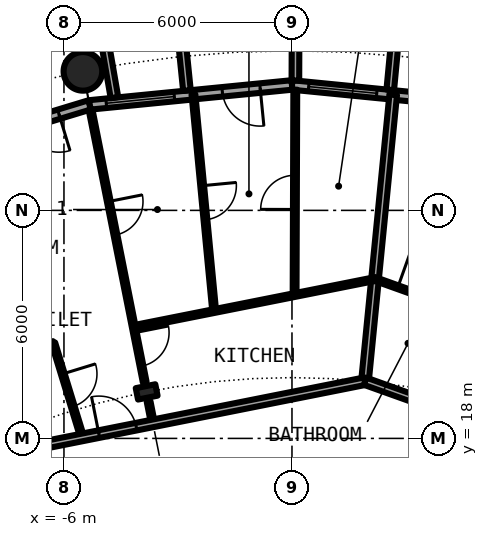
"""IFC4 building model, lengths in metres.
Left out: names, types, materials, properties, quantities, classifications, styles, units other than length and angle.
Written with IfcOpenShell. Run it as: python <this file> out.ifc"""

import sys

from ifc_helpers import new_model, si_unit, direction, frame, frame_2d, origin, origin_2d, place, context, subcontext, project, spatial, rectangle, hollow_circle, i_section, extrude, element, fill, save


model = new_model("IFC4")
c1 = context("Model", 3, precision=1e-05, world=origin(), true_north=direction((0.0, 1.0)))
c2 = subcontext(c1, "Body", "Model", "MODEL_VIEW")
j1 = project(units=[si_unit("LENGTHUNIT", "METRE"), si_unit("PLANEANGLEUNIT", "RADIAN")], contexts=[c1])
p1 = place(None, origin())
s1 = spatial("IfcSite", under=j1, at=p1, CompositionType="ELEMENT")
p2 = place(p1, origin())
s2 = spatial("IfcBuilding", under=s1, at=p2, CompositionType="ELEMENT")
p3 = place(p2, frame((0.0, 0.0, 63.6)))
s3 = spatial("IfcBuildingStorey", under=s2, at=p3, CompositionType="ELEMENT", Elevation=63.6)
p4 = place(p3, frame((-5.501, 27.658, 0.0), z_axis=(0.0, 0.0, 1.0), x_axis=(1.0, 0.0, 0.0)))
e1 = element("IfcColumn", 1, at=p4, inside=s3, PredefinedType="COLUMN", context=c2, shape_type="SweptSolid", body=[
    extrude(hollow_circle(Radius=0.508, WallThickness=0.04, at=origin_2d()), origin(), (0.0, 0.0, 1.0), 3.05),
])
p5 = place(p3, frame((-3.824, 19.223, 0.0), z_axis=(0.0, 0.0, 1.0), x_axis=(-0.195090322016, 0.980785280403, 0.0)))
e2 = element("IfcColumn", 2, at=p5, inside=s3, PredefinedType="COLUMN", context=c2, shape_type="SweptSolid", body=[
    extrude(i_section(OverallWidth=0.306, OverallDepth=0.524, WebThickness=0.021, FlangeThickness=0.04, FilletRadius=0.027, at=origin_2d()), origin(), (0.0, 0.0, 1.0), 3.05),
])
p6 = place(p3, frame((5.326, 26.775, 0.0), z_axis=(0.0, 0.0, 1.0), x_axis=(-0.995173996315, 0.098126026407, 0.0)))
e3 = element("IfcWall", 3, at=p6, inside=s3, PredefinedType="SOLIDWALL", context=c2, shape_type="SweptSolid", body=[
    extrude(rectangle(XDim=5.352, YDim=0.25, at=frame_2d((2.676, 0.0))), origin(), (0.0, 0.0, 1.0), 2.7),
])
p7 = place(p6, frame((0.841, 0.0, 0.0)))
e4 = element("IfcOpeningElement", 4, at=p7, cuts=e3, PredefinedType="OPENING", context=c2, shape_type="SweptSolid", body=[
    extrude(rectangle(XDim=1.0, YDim=2.2, at=frame_2d((0.5, 1.1))), frame((0.0, 0.135, 0.0), z_axis=(0.0, -1.0, 0.0), x_axis=(1.0, 0.0, 0.0)), (0.0, 0.0, 1.0), 0.27),
])
p8 = place(p6, frame((3.111, 0.0, 0.3)))
e5 = element("IfcOpeningElement", 5, at=p8, cuts=e3, PredefinedType="OPENING", context=c2, shape_type="SweptSolid", body=[
    extrude(rectangle(XDim=1.8, YDim=2.1, at=frame_2d((0.9, 1.05))), frame((0.0, 0.135, 0.0), z_axis=(0.0, -1.0, 0.0), x_axis=(1.0, 0.0, 0.0)), (0.0, 0.0, 1.0), 0.27),
])
p9 = place(p3, frame((2.586, 27.171, -0.03), z_axis=(0.0, 0.0, 1.0), x_axis=(0.094548432284, 0.995520262954, 0.0)))
e6 = element("IfcWall", 6, at=p9, inside=s3, PredefinedType="SOLIDWALL", context=c2, shape_type="SweptSolid", body=[
    extrude(rectangle(XDim=3.006, YDim=0.2, at=frame_2d((1.503, 0.0))), origin(), (0.0, 0.0, 1.0), 2.73),
])
p10 = place(p3, frame((0.09, 27.417, -0.03), z_axis=(0.0, 0.0, 1.0), x_axis=(0.00347308367, 0.999993968827, 0.0)))
e7 = element("IfcWall", 7, at=p10, inside=s3, PredefinedType="SOLIDWALL", context=c2, shape_type="SweptSolid", body=[
    extrude(rectangle(XDim=2.882, YDim=0.2, at=frame_2d((1.441, 0.0))), origin(), (0.0, 0.0, 1.0), 2.73),
])
p11 = place(p3, frame((0.0, 27.3, 0.0), z_axis=(0.0, 0.0, 1.0), x_axis=(-0.995173996315, -0.098126026407, 0.0)))
e8 = element("IfcWall", 8, at=p11, inside=s3, PredefinedType="SOLIDWALL", context=c2, shape_type="SweptSolid", body=[
    extrude(rectangle(XDim=5.352, YDim=0.25, at=frame_2d((2.676, 0.0))), origin(), (0.0, 0.0, 1.0), 2.7),
])
p12 = place(p11, frame((0.841, 0.0, 0.0)))
e9 = element("IfcOpeningElement", 9, at=p12, cuts=e8, PredefinedType="OPENING", context=c2, shape_type="SweptSolid", body=[
    extrude(rectangle(XDim=1.0, YDim=2.2, at=frame_2d((0.5, 1.1))), frame((0.0, 0.135, 0.0), z_axis=(0.0, -1.0, 0.0), x_axis=(1.0, 0.0, 0.0)), (0.0, 0.0, 1.0), 0.27),
])
p13 = place(p11, frame((3.111, 0.0, 0.3)))
e10 = element("IfcOpeningElement", 10, at=p13, cuts=e8, PredefinedType="OPENING", context=c2, shape_type="SweptSolid", body=[
    extrude(rectangle(XDim=1.8, YDim=2.1, at=frame_2d((0.9, 1.05))), frame((0.0, 0.135, 0.0), z_axis=(0.0, -1.0, 0.0), x_axis=(1.0, 0.0, 0.0)), (0.0, 0.0, 1.0), 0.27),
])
p14 = place(p3, frame((-2.764, 27.153, -0.03), z_axis=(0.0, 0.0, 1.0), x_axis=(-0.101505487237, 0.994834979311, 0.0)))
e11 = element("IfcWall", 11, at=p14, inside=s3, PredefinedType="SOLIDWALL", context=c2, shape_type="SweptSolid", body=[
    extrude(rectangle(XDim=3.007, YDim=0.2, at=frame_2d((1.503, 0.0))), origin(), (0.0, 0.0, 1.0), 2.73),
])
p15 = place(p3, frame((-4.671, 26.966, -0.03), z_axis=(0.0, 0.0, 1.0), x_axis=(-0.170539878907, 0.985350774954, 0.0)))
e12 = element("IfcWall", 12, at=p15, inside=s3, PredefinedType="SOLIDWALL", context=c2, shape_type="SweptSolid", body=[
    extrude(rectangle(XDim=2.932, YDim=0.2, at=frame_2d((1.466, 0.0))), origin(), (0.0, 0.0, 1.0), 2.73),
])
p16 = place(p3, frame((-5.326, 26.775, 0.0), z_axis=(0.0, 0.0, 1.0), x_axis=(-0.956965678721, -0.290201119486, 0.0)))
e13 = element("IfcWall", 13, at=p16, inside=s3, PredefinedType="SOLIDWALL", context=c2, shape_type="SweptSolid", body=[
    extrude(rectangle(XDim=5.351, YDim=0.25, at=frame_2d((2.676, 0.0))), origin(), (0.0, 0.0, 1.0), 2.7),
])
p17 = place(p16, frame((0.841, 0.0, 0.0)))
e14 = element("IfcOpeningElement", 14, at=p17, cuts=e13, PredefinedType="OPENING", context=c2, shape_type="SweptSolid", body=[
    extrude(rectangle(XDim=1.0, YDim=2.2, at=frame_2d((0.5, 1.1))), frame((0.0, 0.135, 0.0), z_axis=(0.0, -1.0, 0.0), x_axis=(1.0, 0.0, 0.0)), (0.0, 0.0, 1.0), 0.27),
])
p18 = place(p16, frame((3.111, 0.0, 0.3)))
e15 = element("IfcOpeningElement", 15, at=p18, cuts=e13, PredefinedType="OPENING", context=c2, shape_type="SweptSolid", body=[
    extrude(rectangle(XDim=1.8, YDim=2.1, at=frame_2d((0.9, 1.05))), frame((0.0, 0.135, 0.0), z_axis=(0.0, -1.0, 0.0), x_axis=(1.0, 0.0, 0.0)), (0.0, 0.0, 1.0), 0.27),
])
p19 = place(p3, frame((-5.301, 26.653, 0.0), z_axis=(0.0, 0.0, 1.0), x_axis=(0.194986141751, -0.980805997395, 0.0)))
e16 = element("IfcWall", 16, at=p19, inside=s3, PredefinedType="PARTITIONING", context=c2, shape_type="SweptSolid", body=[
    extrude(rectangle(XDim=7.313, YDim=0.1, at=frame_2d((3.657, 0.0))), origin(), (0.0, 0.0, 1.0), 2.7),
])
p20 = place(p19, frame((5.985, 0.0, 0.0)))
e17 = element("IfcOpeningElement", 17, at=p20, cuts=e16, PredefinedType="OPENING", context=c2, shape_type="SweptSolid", body=[
    extrude(rectangle(XDim=0.9, YDim=2.3, at=frame_2d((0.45, 1.15))), frame((0.0, 0.06, 0.0), z_axis=(0.0, -1.0, 0.0), x_axis=(1.0, 0.0, 0.0)), (0.0, 0.0, 1.0), 0.12),
])
p21 = place(p19, frame((2.467, 0.0, 0.0)))
e18 = element("IfcOpeningElement", 18, at=p21, cuts=e16, PredefinedType="OPENING", context=c2, shape_type="SweptSolid", body=[
    extrude(rectangle(XDim=0.9, YDim=2.3, at=frame_2d((0.45, 1.15))), frame((0.0, 0.06, 0.0), z_axis=(0.0, -1.0, 0.0), x_axis=(1.0, 0.0, 0.0)), (0.0, 0.0, 1.0), 0.12),
])
p22 = place(p3, frame((-3.772, 18.966, 0.0), z_axis=(0.0, 0.0, 1.0), x_axis=(0.194500150765, -0.980902488198, 0.0)))
e19 = element("IfcWall", 19, at=p22, inside=s3, PredefinedType="PARTITIONING", context=c2, shape_type="SweptSolid", body=[
    extrude(rectangle(XDim=0.581, YDim=0.1, at=frame_2d((0.291, 0.0))), origin(), (0.0, 0.0, 1.0), 2.7),
])
p23 = place(p3, frame((-2.593, 27.051, 0.0), z_axis=(0.0, 0.0, 1.0), x_axis=(0.095336244636, -0.995445126794, 0.0)))
e20 = element("IfcWall", 20, at=p23, inside=s3, PredefinedType="PARTITIONING", context=c2, shape_type="SweptSolid", body=[
    extrude(rectangle(XDim=5.726, YDim=0.1, at=frame_2d((2.863, 0.0))), origin(), (0.0, 0.0, 1.0), 2.7),
])
p24 = place(p23, frame((2.413, 0.0, 0.0)))
e21 = element("IfcOpeningElement", 21, at=p24, cuts=e20, PredefinedType="OPENING", context=c2, shape_type="SweptSolid", body=[
    extrude(rectangle(XDim=0.9, YDim=2.3, at=frame_2d((0.45, 1.15))), frame((0.0, 0.06, 0.0), z_axis=(0.0, -1.0, 0.0), x_axis=(1.0, 0.0, 0.0)), (0.0, 0.0, 1.0), 0.12),
])
p25 = place(p3, frame((0.069, 21.772, 0.0), z_axis=(0.0, 0.0, 1.0), x_axis=(0.003298522564, 0.99999455986, 0.0)))
e22 = element("IfcWall", 22, at=p25, inside=s3, PredefinedType="PARTITIONING", context=c2, shape_type="SweptSolid", body=[
    extrude(rectangle(XDim=5.403, YDim=0.1, at=frame_2d((2.702, 0.0))), origin(), (0.0, 0.0, 1.0), 2.7),
])
p26 = place(p25, frame((2.252, 0.0, 0.0)))
e23 = element("IfcOpeningElement", 23, at=p26, cuts=e22, PredefinedType="OPENING", context=c2, shape_type="SweptSolid", body=[
    extrude(rectangle(XDim=0.9, YDim=2.3, at=frame_2d((0.45, 1.15))), frame((0.0, 0.06, 0.0), z_axis=(0.0, -1.0, 0.0), x_axis=(1.0, 0.0, 0.0)), (0.0, 0.0, 1.0), 0.12),
])
p27 = place(p3, frame((1.921, 19.506, 0.0), z_axis=(0.0, 0.0, 1.0), x_axis=(0.098115395479, 0.995175044487, 0.0)))
e24 = element("IfcWall", 24, at=p27, inside=s3, PredefinedType="PARTITIONING", context=c2, shape_type="SweptSolid", body=[
    extrude(rectangle(XDim=7.574, YDim=0.2, at=frame_2d((3.787, 0.0))), origin(), (0.0, 0.0, 1.0), 2.7),
])
p28 = place(p3, frame((-6.28, 20.509, 0.0), z_axis=(0.0, 0.0, 1.0), x_axis=(0.293008940941, -0.956109701095, 0.0)))
e25 = element("IfcWall", 25, at=p28, inside=s3, PredefinedType="PARTITIONING", context=c2, shape_type="SweptSolid", body=[
    extrude(rectangle(XDim=2.597, YDim=0.1, at=frame_2d((1.299, 0.0))), origin(), (0.0, 0.0, 1.0), 2.7),
])
p29 = place(p28, frame((0.849, 0.0, 0.0)))
e26 = element("IfcOpeningElement", 26, at=p29, cuts=e25, PredefinedType="OPENING", context=c2, shape_type="SweptSolid", body=[
    extrude(rectangle(XDim=0.9, YDim=2.3, at=frame_2d((0.45, 1.15))), frame((0.0, 0.06, 0.0), z_axis=(0.0, -1.0, 0.0), x_axis=(1.0, 0.0, 0.0)), (0.0, 0.0, 1.0), 0.12),
])
p30 = place(p3, frame((-9.239, 17.286, 0.0), z_axis=(0.0, 0.0, 1.0), x_axis=(0.98077905287, 0.195121627328, 0.0)))
e27 = element("IfcWall", 27, at=p30, inside=s3, PredefinedType="PARTITIONING", context=c2, shape_type="SweptSolid", body=[
    extrude(rectangle(XDim=11.379, YDim=0.2, at=frame_2d((5.689, 0.0))), origin(), (0.0, 0.0, 1.0), 2.38),
])
p31 = place(p30, frame((4.241, 0.0, 0.0)))
e28 = element("IfcOpeningElement", 28, at=p31, cuts=e27, PredefinedType="OPENING", context=c2, shape_type="SweptSolid", body=[
    extrude(rectangle(XDim=1.0, YDim=2.3, at=frame_2d((0.5, 1.15))), frame((0.0, 0.11, 0.0), z_axis=(0.0, -1.0, 0.0), x_axis=(1.0, 0.0, 0.0)), (0.0, 0.0, 1.0), 0.22),
])
p32 = place(p3, frame((1.924, 19.505, 0.0), z_axis=(0.0, 0.0, 1.0), x_axis=(0.941497449807, -0.337020106237, 0.0)))
e29 = element("IfcWall", 29, at=p32, inside=s3, PredefinedType="PARTITIONING", context=c2, shape_type="SweptSolid", body=[
    extrude(rectangle(XDim=9.364, YDim=0.2, at=frame_2d((4.682, 0.0))), origin(), (0.0, 0.0, 1.0), 2.38),
])
p33 = place(p32, frame((4.259, 0.0, 0.0)))
e30 = element("IfcOpeningElement", 30, at=p33, cuts=e29, PredefinedType="OPENING", context=c2, shape_type="SweptSolid", body=[
    extrude(rectangle(XDim=1.0, YDim=2.3, at=frame_2d((0.5, 1.15))), frame((0.0, 0.11, 0.0), z_axis=(0.0, -1.0, 0.0), x_axis=(1.0, 0.0, 0.0)), (0.0, 0.0, 1.0), 0.22),
])
p34 = place(p3, frame((-10.511, 19.667, 0.0), z_axis=(0.0, 0.0, 1.0), x_axis=(0.980773878384, 0.195147635084, 0.0)))
e31 = element("IfcWall", 31, at=p34, inside=s3, PredefinedType="PARTITIONING", context=c2, shape_type="SweptSolid", body=[
    extrude(rectangle(XDim=4.315, YDim=0.1, at=frame_2d((2.157, 0.0))), origin(), (0.0, 0.0, 1.0), 2.7),
])
p35 = place(p34, frame((0.628, 0.0, 0.0)))
e32 = element("IfcOpeningElement", 32, at=p35, cuts=e31, PredefinedType="OPENING", context=c2, shape_type="SweptSolid", body=[
    extrude(rectangle(XDim=0.9, YDim=2.3, at=frame_2d((0.45, 1.15))), frame((0.0, 0.06, 0.0), z_axis=(0.0, -1.0, 0.0), x_axis=(1.0, 0.0, 0.0)), (0.0, 0.0, 1.0), 0.12),
])
p36 = place(p3, frame((-4.163, 20.93, 0.0), z_axis=(0.0, 0.0, 1.0), x_axis=(0.98077745026, 0.195129682675, 0.0)))
e33 = element("IfcWall", 33, at=p36, inside=s3, PredefinedType="PARTITIONING", context=c2, shape_type="SweptSolid", body=[
    extrude(rectangle(XDim=6.474, YDim=0.1, at=frame_2d((3.237, 0.0))), origin(), (0.0, 0.0, 1.0), 2.7),
])
p37 = place(p3, frame((2.186, 22.193, 0.0), z_axis=(0.0, 0.0, 1.0), x_axis=(0.941413199806, -0.337255373909, 0.0)))
e34 = element("IfcWall", 34, at=p37, inside=s3, PredefinedType="PARTITIONING", context=c2, shape_type="SweptSolid", body=[
    extrude(rectangle(XDim=4.341, YDim=0.1, at=frame_2d((2.171, 0.0))), origin(), (0.0, 0.0, 1.0), 2.7),
])
p38 = place(p37, frame((0.637, 0.0, 0.0)))
e35 = element("IfcOpeningElement", 35, at=p38, cuts=e34, PredefinedType="OPENING", context=c2, shape_type="SweptSolid", body=[
    extrude(rectangle(XDim=0.9, YDim=2.3, at=frame_2d((0.45, 1.15))), frame((0.0, 0.06, 0.0), z_axis=(0.0, -1.0, 0.0), x_axis=(1.0, 0.0, 0.0)), (0.0, 0.0, 1.0), 0.12),
])
p39 = place(p8, origin())
e36 = element("IfcWindow", 36, at=p39, inside=s3, PartitioningType="SINGLE_PANEL", PredefinedType="WINDOW", context=c2, shape_type="SweptSolid", body=[
    extrude(rectangle(XDim=1.8, YDim=2.1, at=frame_2d((0.9, 1.05))), frame((0.0, 0.03, 0.0), z_axis=(0.0, -1.0, 0.0), x_axis=(1.0, 0.0, 0.0)), (0.0, 0.0, 1.0), 0.06),
])
fill(e5, e36)
p40 = place(p12, origin())
e37 = element("IfcDoor", 37, at=p40, inside=s3, OperationType="SINGLE_SWING_LEFT", PredefinedType="DOOR", context=c2, shape_type="SweptSolid", body=[
    extrude(rectangle(XDim=1.0, YDim=2.2, at=frame_2d((0.5, 1.1))), frame((0.0, 0.025, 0.0), z_axis=(0.0, -1.0, 0.0), x_axis=(1.0, 0.0, 0.0)), (0.0, 0.0, 1.0), 0.05),
])
fill(e9, e37)
p41 = place(p13, origin())
e38 = element("IfcWindow", 38, at=p41, inside=s3, PartitioningType="SINGLE_PANEL", PredefinedType="WINDOW", context=c2, shape_type="SweptSolid", body=[
    extrude(rectangle(XDim=1.8, YDim=2.1, at=frame_2d((0.9, 1.05))), frame((0.0, 0.03, 0.0), z_axis=(0.0, -1.0, 0.0), x_axis=(1.0, 0.0, 0.0)), (0.0, 0.0, 1.0), 0.06),
])
fill(e10, e38)
p42 = place(p17, origin())
e39 = element("IfcDoor", 39, at=p42, inside=s3, OperationType="SINGLE_SWING_LEFT", PredefinedType="DOOR", context=c2, shape_type="SweptSolid", body=[
    extrude(rectangle(XDim=1.0, YDim=2.2, at=frame_2d((0.5, 1.1))), frame((0.0, 0.025, 0.0), z_axis=(0.0, -1.0, 0.0), x_axis=(1.0, 0.0, 0.0)), (0.0, 0.0, 1.0), 0.05),
])
fill(e14, e39)
p43 = place(p38, origin())
e40 = element("IfcDoor", 40, at=p43, inside=s3, OperationType="SINGLE_SWING_LEFT", PredefinedType="DOOR", context=c2, shape_type="SweptSolid", body=[
    extrude(rectangle(XDim=0.9, YDim=2.3, at=frame_2d((0.45, 1.15))), frame((0.0, 0.025, 0.0), z_axis=(0.0, -1.0, 0.0), x_axis=(1.0, 0.0, 0.0)), (0.0, 0.0, 1.0), 0.05),
])
fill(e35, e40)
p44 = place(p31, origin())
e41 = element("IfcDoor", 41, at=p44, inside=s3, OperationType="SINGLE_SWING_LEFT", PredefinedType="DOOR", context=c2, shape_type="SweptSolid", body=[
    extrude(rectangle(XDim=1.0, YDim=2.3, at=frame_2d((0.5, 1.15))), frame((0.0, 0.025, 0.0), z_axis=(0.0, -1.0, 0.0), x_axis=(1.0, 0.0, 0.0)), (0.0, 0.0, 1.0), 0.05),
])
fill(e28, e41)
p45 = place(p29, origin())
e42 = element("IfcDoor", 42, at=p45, inside=s3, OperationType="SINGLE_SWING_LEFT", PredefinedType="DOOR", context=c2, shape_type="SweptSolid", body=[
    extrude(rectangle(XDim=0.9, YDim=2.3, at=frame_2d((0.45, 1.15))), frame((0.0, 0.025, 0.0), z_axis=(0.0, -1.0, 0.0), x_axis=(1.0, 0.0, 0.0)), (0.0, 0.0, 1.0), 0.05),
])
fill(e26, e42)
p46 = place(p20, origin())
e43 = element("IfcDoor", 43, at=p46, inside=s3, OperationType="SINGLE_SWING_RIGHT", PredefinedType="DOOR", context=c2, shape_type="SweptSolid", body=[
    extrude(rectangle(XDim=0.9, YDim=2.3, at=frame_2d((0.45, 1.15))), frame((0.0, 0.025, 0.0), z_axis=(0.0, -1.0, 0.0), x_axis=(1.0, 0.0, 0.0)), (0.0, 0.0, 1.0), 0.05),
])
fill(e17, e43)
p47 = place(p21, origin())
e44 = element("IfcDoor", 44, at=p47, inside=s3, OperationType="SINGLE_SWING_LEFT", PredefinedType="DOOR", context=c2, shape_type="SweptSolid", body=[
    extrude(rectangle(XDim=0.9, YDim=2.3, at=frame_2d((0.45, 1.15))), frame((0.0, 0.025, 0.0), z_axis=(0.0, -1.0, 0.0), x_axis=(1.0, 0.0, 0.0)), (0.0, 0.0, 1.0), 0.05),
])
fill(e18, e44)
p48 = place(p24, origin())
e45 = element("IfcDoor", 45, at=p48, inside=s3, OperationType="SINGLE_SWING_LEFT", PredefinedType="DOOR", context=c2, shape_type="SweptSolid", body=[
    extrude(rectangle(XDim=0.9, YDim=2.3, at=frame_2d((0.45, 1.15))), frame((0.0, 0.025, 0.0), z_axis=(0.0, -1.0, 0.0), x_axis=(1.0, 0.0, 0.0)), (0.0, 0.0, 1.0), 0.05),
])
fill(e21, e45)
p49 = place(p26, origin())
e46 = element("IfcDoor", 46, at=p49, inside=s3, OperationType="SINGLE_SWING_LEFT", PredefinedType="DOOR", context=c2, shape_type="SweptSolid", body=[
    extrude(rectangle(XDim=0.9, YDim=2.3, at=frame_2d((0.45, 1.15))), frame((0.0, 0.025, 0.0), z_axis=(0.0, -1.0, 0.0), x_axis=(1.0, 0.0, 0.0)), (0.0, 0.0, 1.0), 0.05),
])
fill(e23, e46)
save(model, sys.argv[1])
